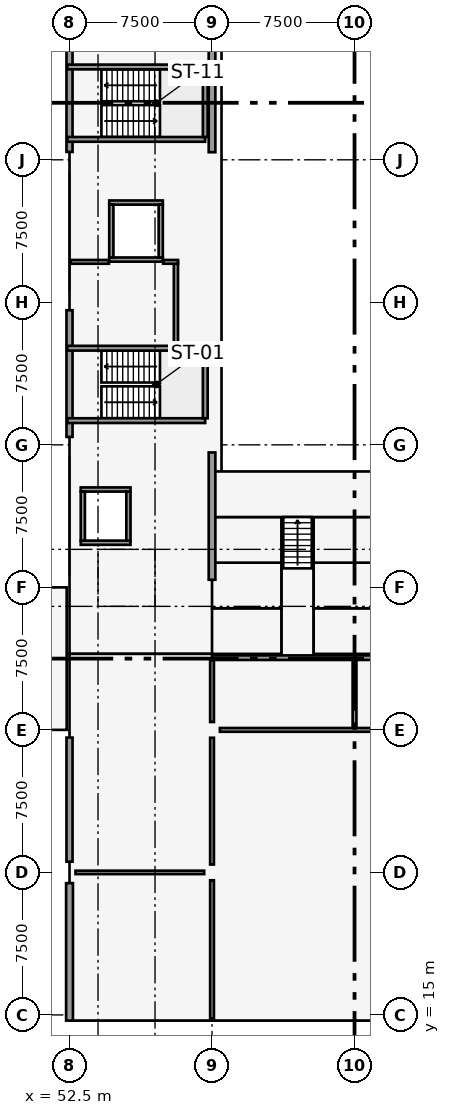
"""IFC4 building model, lengths in metres.
Left out: names, types, materials, properties, quantities, classifications, styles, units other than length and angle.
Written with IfcOpenShell. Run it as: python <this file> out.ifc"""

import sys

from ifc_helpers import new_model, si_unit, direction, frame, frame_2d, origin, origin_2d, place, context, subcontext, project, spatial, rectangle, extrude, element, fill, save


model = new_model("IFC4")
c1 = context("Model", 3, precision=1e-05, world=origin(), true_north=direction((0.0, 1.0)))
c2 = subcontext(c1, "Body", "Model", "MODEL_VIEW")
j1 = project(units=[si_unit("LENGTHUNIT", "METRE"), si_unit("PLANEANGLEUNIT", "RADIAN")], contexts=[c1])
p1 = place(None, origin())
s1 = spatial("IfcSite", under=j1, at=p1, CompositionType="ELEMENT")
p2 = place(p1, origin())
s2 = spatial("IfcBuilding", under=s1, at=p2, CompositionType="ELEMENT")
p3 = place(p2, frame((0.0, 0.0, 9.0)))
s3 = spatial("IfcBuildingStorey", under=s2, at=p3, CompositionType="ELEMENT", Elevation=9.0)
p4 = place(p3, frame((52.5, 22.5, 0.0), z_axis=(0.0, 0.0, 1.0), x_axis=(1.0, 0.0, 0.0)))
e1 = element("IfcColumn", 1, at=p4, inside=s3, PredefinedType="COLUMN", context=c2, shape_type="SweptSolid", body=[
    extrude(rectangle(XDim=0.6, YDim=1.1, at=origin_2d()), origin(), (0.0, 0.0, 1.0), 4.2),
])
for number, where, z_axis, x_axis in (
    (2, (52.5, 30.0, 0.0), (0.0, 0.0, 1.0), (1.0, 0.0, 0.0)),
    (3, (52.5, 37.5, 0.0), (0.0, 0.0, 1.0), (1.0, 0.0, 0.0)),
    (4, (52.5, 45.0, 0.0), (0.0, 0.0, 1.0), (1.0, 0.0, 0.0)),
    (5, (52.5, 52.5, 0.0), (0.0, 0.0, 1.0), (1.0, 0.0, 0.0)),
    (6, (52.5, 60.0, 0.0), (0.0, 0.0, 1.0), (1.0, 0.0, 0.0)),
    (7, (60.0, 22.5, 0.0), (0.0, 0.0, 1.0), (1.0, 0.0, 0.0)),
    (8, (60.0, 30.0, 0.0), (0.0, 0.0, 1.0), (1.0, 0.0, 0.0)),
    (9, (60.0, 37.5, 0.0), (0.0, 0.0, 1.0), (1.0, 0.0, 0.0)),
    (10, (60.0, 45.0, 0.0), (0.0, 0.0, 1.0), (1.0, 0.0, 0.0)),
    (11, (60.0, 52.5, 0.0), (0.0, 0.0, 1.0), (1.0, 0.0, 0.0)),
    (12, (60.0, 60.0, 0.0), (0.0, 0.0, 1.0), (1.0, 0.0, 0.0)),
):
    element("IfcColumn", number, at=place(p3, frame(where, z_axis=z_axis, x_axis=x_axis)), inside=s3, PredefinedType="COLUMN", context=c2, shape_type="SweptSolid", body=[
        extrude(rectangle(XDim=0.8, YDim=0.8, at=origin_2d()), origin(), (0.0, 0.0, 1.0), 4.2),
    ])
p5 = place(p3, frame((60.0, 37.9, 0.0), z_axis=(0.0, 0.0, 1.0), x_axis=(0.0, 1.0, 0.0)))
e13 = element("IfcWall", 13, at=p5, inside=s3, PredefinedType="SHEAR", context=c2, shape_type="SweptSolid", body=[
    extrude(rectangle(XDim=6.7, YDim=0.35, at=frame_2d((3.35, 0.0))), origin(), (0.0, 0.0, 1.0), 2.72),
])
p6 = place(p3, frame((60.0, 60.4, 0.0), z_axis=(0.0, 0.0, 1.0), x_axis=(0.0, 1.0, 0.0)))
e14 = element("IfcWall", 14, at=p6, inside=s3, PredefinedType="SHEAR", context=c2, shape_type="SweptSolid", body=[
    extrude(rectangle(XDim=6.7, YDim=0.35, at=frame_2d((3.35, 0.0))), origin(), (0.0, 0.0, 1.0), 2.85),
])
p7 = place(p3, frame((52.5, 14.7, 0.0), z_axis=(0.0, 0.0, 1.0), x_axis=(0.0, 1.0, 0.0)))
e15 = element("IfcWall", 15, at=p7, inside=s3, PredefinedType="SOLIDWALL", context=c2, shape_type="SweptSolid", body=[
    extrude(rectangle(XDim=7.235, YDim=0.36, at=frame_2d((3.618, 0.0))), origin(), (0.0, 0.0, 1.0), 2.69),
])
p8 = place(p3, frame((52.5, 23.065, 0.0), z_axis=(0.0, 0.0, 1.0), x_axis=(0.0, 1.0, 0.0)))
e16 = element("IfcWall", 16, at=p8, inside=s3, PredefinedType="SOLIDWALL", context=c2, shape_type="SweptSolid", body=[
    extrude(rectangle(XDim=6.53, YDim=0.32, at=frame_2d((3.265, 0.0))), origin(), (0.0, 0.0, 1.0), 2.69),
])
p9 = place(p3, frame((52.5, 45.415, 0.0), z_axis=(0.0, 0.0, 1.0), x_axis=(0.0, 1.0, 0.0)))
e17 = element("IfcWall", 17, at=p9, inside=s3, PredefinedType="SOLIDWALL", context=c2, shape_type="SweptSolid", body=[
    extrude(rectangle(XDim=6.67, YDim=0.32, at=frame_2d((3.335, 0.0))), origin(), (0.0, 0.0, 1.0), 2.97),
])
p10 = place(p3, frame((52.5, 60.415, 0.0), z_axis=(0.0, 0.0, 1.0), x_axis=(0.0, 1.0, 0.0)))
e18 = element("IfcWall", 18, at=p10, inside=s3, PredefinedType="SOLIDWALL", context=c2, shape_type="SweptSolid", body=[
    extrude(rectangle(XDim=6.67, YDim=0.32, at=frame_2d((3.335, 0.0))), origin(), (0.0, 0.0, 1.0), 2.82),
])
p11 = place(p3, frame((52.38, 46.275, 0.0), z_axis=(0.0, 0.0, 1.0), x_axis=(1.0, 0.0, 0.0)))
e19 = element("IfcWall", 19, at=p11, inside=s3, PredefinedType="SOLIDWALL", context=c2, shape_type="SweptSolid", body=[
    extrude(rectangle(XDim=7.26, YDim=0.25, at=frame_2d((3.63, 0.0))), origin(), (0.0, 0.0, 1.0), 3.92),
])
p12 = place(p11, frame((0.62, 0.0, 0.0)))
e20 = element("IfcOpeningElement", 20, at=p12, cuts=e19, PredefinedType="OPENING", context=c2, shape_type="SweptSolid", body=[
    extrude(rectangle(XDim=1.1, YDim=2.15, at=frame_2d((0.55, 1.075))), frame((0.0, 0.135, 0.0), z_axis=(0.0, -1.0, 0.0), x_axis=(1.0, 0.0, 0.0)), (0.0, 0.0, 1.0), 0.27),
])
p13 = place(p3, frame((52.38, 50.085, 0.0), z_axis=(0.0, 0.0, 1.0), x_axis=(1.0, 0.0, 0.0)))
e21 = element("IfcWall", 21, at=p13, inside=s3, PredefinedType="SOLIDWALL", context=c2, shape_type="SweptSolid", body=[
    extrude(rectangle(XDim=7.26, YDim=0.25, at=frame_2d((3.63, 0.0))), origin(), (0.0, 0.0, 1.0), 3.92),
])
p14 = place(p13, frame((0.62, 0.0, 0.0)))
e22 = element("IfcOpeningElement", 22, at=p14, cuts=e21, PredefinedType="OPENING", context=c2, shape_type="SweptSolid", body=[
    extrude(rectangle(XDim=1.1, YDim=2.15, at=frame_2d((0.55, 1.075))), frame((0.0, 0.135, 0.0), z_axis=(0.0, -1.0, 0.0), x_axis=(1.0, 0.0, 0.0)), (0.0, 0.0, 1.0), 0.27),
])
p15 = place(p3, frame((59.645, 46.4, 0.0), z_axis=(0.0, 0.0, 1.0), x_axis=(0.0, 1.0, 0.0)))
e23 = element("IfcWall", 23, at=p15, inside=s3, PredefinedType="SOLIDWALL", context=c2, shape_type="SweptSolid", body=[
    extrude(rectangle(XDim=3.56, YDim=0.25, at=frame_2d((1.78, 0.0))), origin(), (0.0, 0.0, 1.0), 3.92),
])
p16 = place(p3, frame((52.38, 61.075, 0.0), z_axis=(0.0, 0.0, 1.0), x_axis=(1.0, 0.0, 0.0)))
e24 = element("IfcWall", 24, at=p16, inside=s3, PredefinedType="SOLIDWALL", context=c2, shape_type="SweptSolid", body=[
    extrude(rectangle(XDim=7.26, YDim=0.25, at=frame_2d((3.63, 0.0))), origin(), (0.0, 0.0, 1.0), 3.92),
])
p17 = place(p16, frame((0.62, 0.0, 0.0)))
e25 = element("IfcOpeningElement", 25, at=p17, cuts=e24, PredefinedType="OPENING", context=c2, shape_type="SweptSolid", body=[
    extrude(rectangle(XDim=1.1, YDim=2.15, at=frame_2d((0.55, 1.075))), frame((0.0, 0.135, 0.0), z_axis=(0.0, -1.0, 0.0), x_axis=(1.0, 0.0, 0.0)), (0.0, 0.0, 1.0), 0.27),
])
p18 = place(p3, frame((52.38, 64.885, 0.0), z_axis=(0.0, 0.0, 1.0), x_axis=(1.0, 0.0, 0.0)))
e26 = element("IfcWall", 26, at=p18, inside=s3, PredefinedType="SOLIDWALL", context=c2, shape_type="SweptSolid", body=[
    extrude(rectangle(XDim=7.26, YDim=0.25, at=frame_2d((3.63, 0.0))), origin(), (0.0, 0.0, 1.0), 3.92),
])
p19 = place(p18, frame((0.62, 0.0, 0.0)))
e27 = element("IfcOpeningElement", 27, at=p19, cuts=e26, PredefinedType="OPENING", context=c2, shape_type="SweptSolid", body=[
    extrude(rectangle(XDim=1.1, YDim=2.15, at=frame_2d((0.55, 1.075))), frame((0.0, 0.135, 0.0), z_axis=(0.0, -1.0, 0.0), x_axis=(1.0, 0.0, 0.0)), (0.0, 0.0, 1.0), 0.27),
])
p20 = place(p3, frame((59.645, 61.2, 0.0), z_axis=(0.0, 0.0, 1.0), x_axis=(0.0, 1.0, 0.0)))
e28 = element("IfcWall", 28, at=p20, inside=s3, PredefinedType="SOLIDWALL", context=c2, shape_type="SweptSolid", body=[
    extrude(rectangle(XDim=3.56, YDim=0.25, at=frame_2d((1.78, 0.0))), origin(), (0.0, 0.0, 1.0), 3.92),
])
for number, where, z_axis, x_axis in (
    (29, (53.09, 39.85, 0.0), (0.0, 0.0, 1.0), (1.0, 0.0, 0.0)),
    (30, (53.09, 42.65, 0.0), (0.0, 0.0, 1.0), (1.0, 0.0, 0.0)),
):
    element("IfcWall", number, at=place(p3, frame(where, z_axis=z_axis, x_axis=x_axis)), inside=s3, PredefinedType="SOLIDWALL", context=c2, shape_type="SweptSolid", body=[
        extrude(rectangle(XDim=2.62, YDim=0.22, at=frame_2d((1.31, 0.0))), origin(), (0.0, 0.0, 1.0), 3.92),
    ])
p21 = place(p3, frame((53.2, 39.96, 0.0), z_axis=(0.0, 0.0, 1.0), x_axis=(0.0, 1.0, 0.0)))
e31 = element("IfcWall", 31, at=p21, inside=s3, PredefinedType="SOLIDWALL", context=c2, shape_type="SweptSolid", body=[
    extrude(rectangle(XDim=2.58, YDim=0.22, at=frame_2d((1.29, 0.0))), origin(), (0.0, 0.0, 1.0), 3.92),
])
p22 = place(p3, frame((55.6, 39.96, 0.0), z_axis=(0.0, 0.0, 1.0), x_axis=(0.0, 1.0, 0.0)))
e32 = element("IfcWall", 32, at=p22, inside=s3, PredefinedType="SOLIDWALL", context=c2, shape_type="SweptSolid", body=[
    extrude(rectangle(XDim=2.58, YDim=0.22, at=frame_2d((1.29, 0.0))), origin(), (0.0, 0.0, 1.0), 3.92),
])
p23 = place(p22, frame((0.79, 0.0, 0.0)))
e33 = element("IfcOpeningElement", 33, at=p23, cuts=e32, PredefinedType="OPENING", context=c2, shape_type="SweptSolid", body=[
    extrude(rectangle(XDim=1.0, YDim=2.15, at=frame_2d((0.5, 1.075))), frame((0.0, 0.12, 0.0), z_axis=(0.0, -1.0, 0.0), x_axis=(1.0, 0.0, 0.0)), (0.0, 0.0, 1.0), 0.24),
])
p24 = place(p3, frame((54.59, 54.75, 0.0), z_axis=(0.0, 0.0, 1.0), x_axis=(1.0, 0.0, 0.0)))
e34 = element("IfcWall", 34, at=p24, inside=s3, PredefinedType="SOLIDWALL", context=c2, shape_type="SweptSolid", body=[
    extrude(rectangle(XDim=2.82, YDim=0.22, at=frame_2d((1.41, 0.0))), origin(), (0.0, 0.0, 1.0), 3.92),
])
p25 = place(p24, frame((0.86, 0.0, 0.0)))
e35 = element("IfcOpeningElement", 35, at=p25, cuts=e34, PredefinedType="OPENING", context=c2, shape_type="SweptSolid", body=[
    extrude(rectangle(XDim=1.1, YDim=2.15, at=frame_2d((0.55, 1.075))), frame((0.0, 0.12, 0.0), z_axis=(0.0, -1.0, 0.0), x_axis=(1.0, 0.0, 0.0)), (0.0, 0.0, 1.0), 0.24),
])
p26 = place(p3, frame((54.59, 57.75, 0.0), z_axis=(0.0, 0.0, 1.0), x_axis=(1.0, 0.0, 0.0)))
e36 = element("IfcWall", 36, at=p26, inside=s3, PredefinedType="SOLIDWALL", context=c2, shape_type="SweptSolid", body=[
    extrude(rectangle(XDim=2.82, YDim=0.22, at=frame_2d((1.41, 0.0))), origin(), (0.0, 0.0, 1.0), 3.92),
])
for number, where, z_axis, x_axis in (
    (37, (54.7, 54.86, 0.0), (0.0, 0.0, 1.0), (0.0, 1.0, 0.0)),
    (38, (57.3, 54.86, 0.0), (0.0, 0.0, 1.0), (0.0, 1.0, 0.0)),
):
    element("IfcWall", number, at=place(p3, frame(where, z_axis=z_axis, x_axis=x_axis)), inside=s3, PredefinedType="SOLIDWALL", context=c2, shape_type="SweptSolid", body=[
        extrude(rectangle(XDim=2.78, YDim=0.22, at=frame_2d((1.39, 0.0))), origin(), (0.0, 0.0, 1.0), 3.92),
    ])
p27 = place(p3, frame((58.1, 50.22, 0.0), z_axis=(0.0, 0.0, 1.0), x_axis=(0.0, 1.0, 0.0)))
e39 = element("IfcWall", 39, at=p27, inside=s3, PredefinedType="SOLIDWALL", context=c2, shape_type="SweptSolid", body=[
    extrude(rectangle(XDim=4.41, YDim=0.22, at=frame_2d((2.205, 0.0))), origin(), (0.0, 0.0, 1.0), 3.92),
])
p28 = place(p27, frame((0.45, 0.0, 0.0)))
e40 = element("IfcOpeningElement", 40, at=p28, cuts=e39, PredefinedType="OPENING", context=c2, shape_type="SweptSolid", body=[
    extrude(rectangle(XDim=1.1, YDim=2.15, at=frame_2d((0.55, 1.075))), frame((0.0, 0.12, 0.0), z_axis=(0.0, -1.0, 0.0), x_axis=(1.0, 0.0, 0.0)), (0.0, 0.0, 1.0), 0.24),
])
p29 = place(p3, frame((52.56, 54.63, 0.0), z_axis=(0.0, 0.0, 1.0), x_axis=(1.0, 0.0, 0.0)))
e41 = element("IfcWall", 41, at=p29, inside=s3, PredefinedType="PARTITIONING", context=c2, shape_type="SweptSolid", body=[
    extrude(rectangle(XDim=2.015, YDim=0.2, at=frame_2d((1.007, 0.0))), origin(), (0.0, 0.0, 1.0), 3.13),
])
p30 = place(p3, frame((57.425, 54.63, 0.0), z_axis=(0.0, 0.0, 1.0), x_axis=(1.0, 0.0, 0.0)))
e42 = element("IfcWall", 42, at=p30, inside=s3, PredefinedType="PARTITIONING", context=c2, shape_type="SweptSolid", body=[
    extrude(rectangle(XDim=0.785, YDim=0.2, at=frame_2d((0.393, 0.0))), origin(), (0.0, 0.0, 1.0), 3.9),
])
p31 = place(p3, frame((52.814, 22.5, 0.0), z_axis=(0.0, 0.0, 1.0), x_axis=(1.0, 0.0, 0.0)))
e43 = element("IfcWall", 43, at=p31, inside=s3, PredefinedType="PARTITIONING", context=c2, shape_type="SweptSolid", body=[
    extrude(rectangle(XDim=6.772, YDim=0.18, at=frame_2d((3.386, 0.0))), origin(), (0.0, 0.0, 1.0), 2.69),
])
p32 = place(p31, frame((2.786, 0.0, 0.0)))
e44 = element("IfcOpeningElement", 44, at=p32, cuts=e43, PredefinedType="OPENING", context=c2, shape_type="SweptSolid", body=[
    extrude(rectangle(XDim=1.3, YDim=2.15, at=frame_2d((0.65, 1.075))), frame((0.0, 0.1, 0.0), z_axis=(0.0, -1.0, 0.0), x_axis=(1.0, 0.0, 0.0)), (0.0, 0.0, 1.0), 0.2),
])
p33 = place(p3, frame((60.414, 30.0, 0.0), z_axis=(0.0, 0.0, 1.0), x_axis=(1.0, 0.0, 0.0)))
e45 = element("IfcWall", 45, at=p33, inside=s3, PredefinedType="PARTITIONING", context=c2, shape_type="SweptSolid", body=[
    extrude(rectangle(XDim=14.172, YDim=0.2, at=frame_2d((7.086, 0.0))), origin(), (0.0, 0.0, 1.0), 2.69),
])
p34 = place(p33, frame((2.586, 0.0, 0.0)))
e46 = element("IfcOpeningElement", 46, at=p34, cuts=e45, PredefinedType="OPENING", context=c2, shape_type="SweptSolid", body=[
    extrude(rectangle(XDim=1.5, YDim=2.16, at=frame_2d((0.75, 1.08))), frame((0.0, 0.11, 0.0), z_axis=(0.0, -1.0, 0.0), x_axis=(1.0, 0.0, 0.0)), (0.0, 0.0, 1.0), 0.22),
])
p35 = place(p3, frame((60.0, 33.8, 0.0), z_axis=(0.0, 0.0, 1.0), x_axis=(1.0, 0.0, 0.0)))
e47 = element("IfcWall", 47, at=p35, inside=s3, PredefinedType="PARTITIONING", context=c2, shape_type="SweptSolid", body=[
    extrude(rectangle(XDim=37.5, YDim=0.24, at=frame_2d((18.75, 0.0))), origin(), (0.0, 0.0, 1.0), 2.69),
])
p36 = place(p35, frame((2.95, 0.0, 0.0)))
e48 = element("IfcOpeningElement", 48, at=p36, cuts=e47, PredefinedType="OPENING", context=c2, shape_type="SweptSolid", body=[
    extrude(rectangle(XDim=1.6, YDim=2.16, at=frame_2d((0.8, 1.08))), frame((0.0, 0.13, 0.0), z_axis=(0.0, -1.0, 0.0), x_axis=(1.0, 0.0, 0.0)), (0.0, 0.0, 1.0), 0.26),
])
p37 = place(p35, frame((32.95, 0.0, 0.0)))
e49 = element("IfcOpeningElement", 49, at=p37, cuts=e47, PredefinedType="OPENING", context=c2, shape_type="SweptSolid", body=[
    extrude(rectangle(XDim=1.6, YDim=2.16, at=frame_2d((0.8, 1.08))), frame((0.0, 0.13, 0.0), z_axis=(0.0, -1.0, 0.0), x_axis=(1.0, 0.0, 0.0)), (0.0, 0.0, 1.0), 0.26),
])
p38 = place(p3, frame((67.5, 30.114, 0.0), z_axis=(0.0, 0.0, 1.0), x_axis=(0.0, 1.0, 0.0)))
e50 = element("IfcWall", 50, at=p38, inside=s3, PredefinedType="PARTITIONING", context=c2, shape_type="SweptSolid", body=[
    extrude(rectangle(XDim=3.552, YDim=0.2, at=frame_2d((1.776, 0.0))), origin(), (0.0, 0.0, 1.0), 2.87),
])
p39 = place(p3, frame((60.0, 14.82, 0.0), z_axis=(0.0, 0.0, 1.0), x_axis=(0.0, 1.0, 0.0)))
e51 = element("IfcWall", 51, at=p39, inside=s3, PredefinedType="PARTITIONING", context=c2, shape_type="SweptSolid", body=[
    extrude(rectangle(XDim=7.266, YDim=0.2, at=frame_2d((3.633, 0.0))), origin(), (0.0, 0.0, 1.0), 2.69),
])
p40 = place(p3, frame((60.0, 22.914, 0.0), z_axis=(0.0, 0.0, 1.0), x_axis=(0.0, 1.0, 0.0)))
e52 = element("IfcWall", 52, at=p40, inside=s3, PredefinedType="PARTITIONING", context=c2, shape_type="SweptSolid", body=[
    extrude(rectangle(XDim=6.672, YDim=0.2, at=frame_2d((3.336, 0.0))), origin(), (0.0, 0.0, 1.0), 2.69),
])
p41 = place(p40, frame((2.536, 0.0, 0.0)))
e53 = element("IfcOpeningElement", 53, at=p41, cuts=e52, PredefinedType="OPENING", context=c2, shape_type="SweptSolid", body=[
    extrude(rectangle(XDim=1.6, YDim=2.15, at=frame_2d((0.8, 1.075))), frame((0.0, 0.11, 0.0), z_axis=(0.0, -1.0, 0.0), x_axis=(1.0, 0.0, 0.0)), (0.0, 0.0, 1.0), 0.22),
])
p42 = place(p3, frame((60.0, 30.414, 0.0), z_axis=(0.0, 0.0, 1.0), x_axis=(0.0, 1.0, 0.0)))
e54 = element("IfcWall", 54, at=p42, inside=s3, PredefinedType="PARTITIONING", context=c2, shape_type="SweptSolid", body=[
    extrude(rectangle(XDim=3.252, YDim=0.2, at=frame_2d((1.626, 0.0))), origin(), (0.0, 0.0, 1.0), 2.69),
])
p43 = place(p42, frame((0.686, 0.0, 0.0)))
e55 = element("IfcOpeningElement", 55, at=p43, cuts=e54, PredefinedType="OPENING", context=c2, shape_type="SweptSolid", body=[
    extrude(rectangle(XDim=1.6, YDim=2.16, at=frame_2d((0.8, 1.08))), frame((0.0, 0.11, 0.0), z_axis=(0.0, -1.0, 0.0), x_axis=(1.0, 0.0, 0.0)), (0.0, 0.0, 1.0), 0.22),
])
p44 = place(p12, origin())
e56 = element("IfcDoor", 56, at=p44, inside=s3, OperationType="SINGLE_SWING_LEFT", PredefinedType="DOOR", context=c2, shape_type="SweptSolid", body=[
    extrude(rectangle(XDim=1.1, YDim=2.15, at=frame_2d((0.55, 1.075))), frame((0.0, 0.025, 0.0), z_axis=(0.0, -1.0, 0.0), x_axis=(1.0, 0.0, 0.0)), (0.0, 0.0, 1.0), 0.05),
])
fill(e20, e56)
p45 = place(p14, frame((1.1, 0.0, 0.0), z_axis=(0.0, 0.0, 1.0), x_axis=(-1.0, 0.0, 0.0)))
e57 = element("IfcDoor", 57, at=p45, inside=s3, OperationType="SINGLE_SWING_RIGHT", PredefinedType="DOOR", context=c2, shape_type="SweptSolid", body=[
    extrude(rectangle(XDim=1.1, YDim=2.15, at=frame_2d((0.55, 1.075))), frame((0.0, 0.025, 0.0), z_axis=(0.0, -1.0, 0.0), x_axis=(1.0, 0.0, 0.0)), (0.0, 0.0, 1.0), 0.05),
])
fill(e22, e57)
p46 = place(p17, origin())
e58 = element("IfcDoor", 58, at=p46, inside=s3, OperationType="SINGLE_SWING_LEFT", PredefinedType="DOOR", context=c2, shape_type="SweptSolid", body=[
    extrude(rectangle(XDim=1.1, YDim=2.15, at=frame_2d((0.55, 1.075))), frame((0.0, 0.025, 0.0), z_axis=(0.0, -1.0, 0.0), x_axis=(1.0, 0.0, 0.0)), (0.0, 0.0, 1.0), 0.05),
])
fill(e25, e58)
p47 = place(p19, frame((1.1, 0.0, 0.0), z_axis=(0.0, 0.0, 1.0), x_axis=(-1.0, 0.0, 0.0)))
e59 = element("IfcDoor", 59, at=p47, inside=s3, OperationType="SINGLE_SWING_RIGHT", PredefinedType="DOOR", context=c2, shape_type="SweptSolid", body=[
    extrude(rectangle(XDim=1.1, YDim=2.15, at=frame_2d((0.55, 1.075))), frame((0.0, 0.025, 0.0), z_axis=(0.0, -1.0, 0.0), x_axis=(1.0, 0.0, 0.0)), (0.0, 0.0, 1.0), 0.05),
])
fill(e27, e59)
p48 = place(p23, origin())
e60 = element("IfcDoor", 60, at=p48, inside=s3, OperationType="SLIDING_TO_LEFT", PredefinedType="DOOR", context=c2, shape_type="SweptSolid", body=[
    extrude(rectangle(XDim=1.0, YDim=2.15, at=frame_2d((0.5, 1.075))), frame((0.0, 0.025, 0.0), z_axis=(0.0, -1.0, 0.0), x_axis=(1.0, 0.0, 0.0)), (0.0, 0.0, 1.0), 0.05),
])
fill(e33, e60)
p49 = place(p25, origin())
e61 = element("IfcDoor", 61, at=p49, inside=s3, OperationType="SLIDING_TO_LEFT", PredefinedType="DOOR", context=c2, shape_type="SweptSolid", body=[
    extrude(rectangle(XDim=1.1, YDim=2.15, at=frame_2d((0.55, 1.075))), frame((0.0, 0.025, 0.0), z_axis=(0.0, -1.0, 0.0), x_axis=(1.0, 0.0, 0.0)), (0.0, 0.0, 1.0), 0.05),
])
fill(e35, e61)
p50 = place(p28, origin())
e62 = element("IfcDoor", 62, at=p50, inside=s3, OperationType="SINGLE_SWING_RIGHT", PredefinedType="DOOR", context=c2, shape_type="SweptSolid", body=[
    extrude(rectangle(XDim=1.1, YDim=2.15, at=frame_2d((0.55, 1.075))), frame((0.0, 0.025, 0.0), z_axis=(0.0, -1.0, 0.0), x_axis=(1.0, 0.0, 0.0)), (0.0, 0.0, 1.0), 0.05),
])
fill(e40, e62)
p51 = place(p32, origin())
e63 = element("IfcDoor", 63, at=p51, inside=s3, OperationType="SINGLE_SWING_RIGHT", PredefinedType="DOOR", context=c2, shape_type="SweptSolid", body=[
    extrude(rectangle(XDim=1.3, YDim=2.15, at=frame_2d((0.65, 1.075))), frame((0.0, 0.025, 0.0), z_axis=(0.0, -1.0, 0.0), x_axis=(1.0, 0.0, 0.0)), (0.0, 0.0, 1.0), 0.05),
])
fill(e44, e63)
p52 = place(p34, origin())
e64 = element("IfcDoor", 64, at=p52, inside=s3, OperationType="SINGLE_SWING_RIGHT", PredefinedType="DOOR", context=c2, shape_type="SweptSolid", body=[
    extrude(rectangle(XDim=1.5, YDim=2.16, at=frame_2d((0.75, 1.08))), frame((0.0, 0.025, 0.0), z_axis=(0.0, -1.0, 0.0), x_axis=(1.0, 0.0, 0.0)), (0.0, 0.0, 1.0), 0.05),
])
fill(e46, e64)
p53 = place(p36, origin())
e65 = element("IfcDoor", 65, at=p53, inside=s3, OperationType="SINGLE_SWING_RIGHT", PredefinedType="DOOR", context=c2, shape_type="SweptSolid", body=[
    extrude(rectangle(XDim=1.6, YDim=2.16, at=frame_2d((0.8, 1.08))), frame((0.0, 0.025, 0.0), z_axis=(0.0, -1.0, 0.0), x_axis=(1.0, 0.0, 0.0)), (0.0, 0.0, 1.0), 0.05),
])
fill(e48, e65)
p54 = place(p41, origin())
e66 = element("IfcDoor", 66, at=p54, inside=s3, OperationType="SINGLE_SWING_RIGHT", PredefinedType="DOOR", context=c2, shape_type="SweptSolid", body=[
    extrude(rectangle(XDim=1.6, YDim=2.15, at=frame_2d((0.8, 1.075))), frame((0.0, 0.025, 0.0), z_axis=(0.0, -1.0, 0.0), x_axis=(1.0, 0.0, 0.0)), (0.0, 0.0, 1.0), 0.05),
])
fill(e53, e66)
p55 = place(p43, origin())
e67 = element("IfcDoor", 67, at=p55, inside=s3, OperationType="SINGLE_SWING_LEFT", PredefinedType="DOOR", context=c2, shape_type="SweptSolid", body=[
    extrude(rectangle(XDim=1.6, YDim=2.16, at=frame_2d((0.8, 1.08))), frame((0.0, 0.025, 0.0), z_axis=(0.0, -1.0, 0.0), x_axis=(1.0, 0.0, 0.0)), (0.0, 0.0, 1.0), 0.05),
])
fill(e55, e67)
save(model, sys.argv[1])
